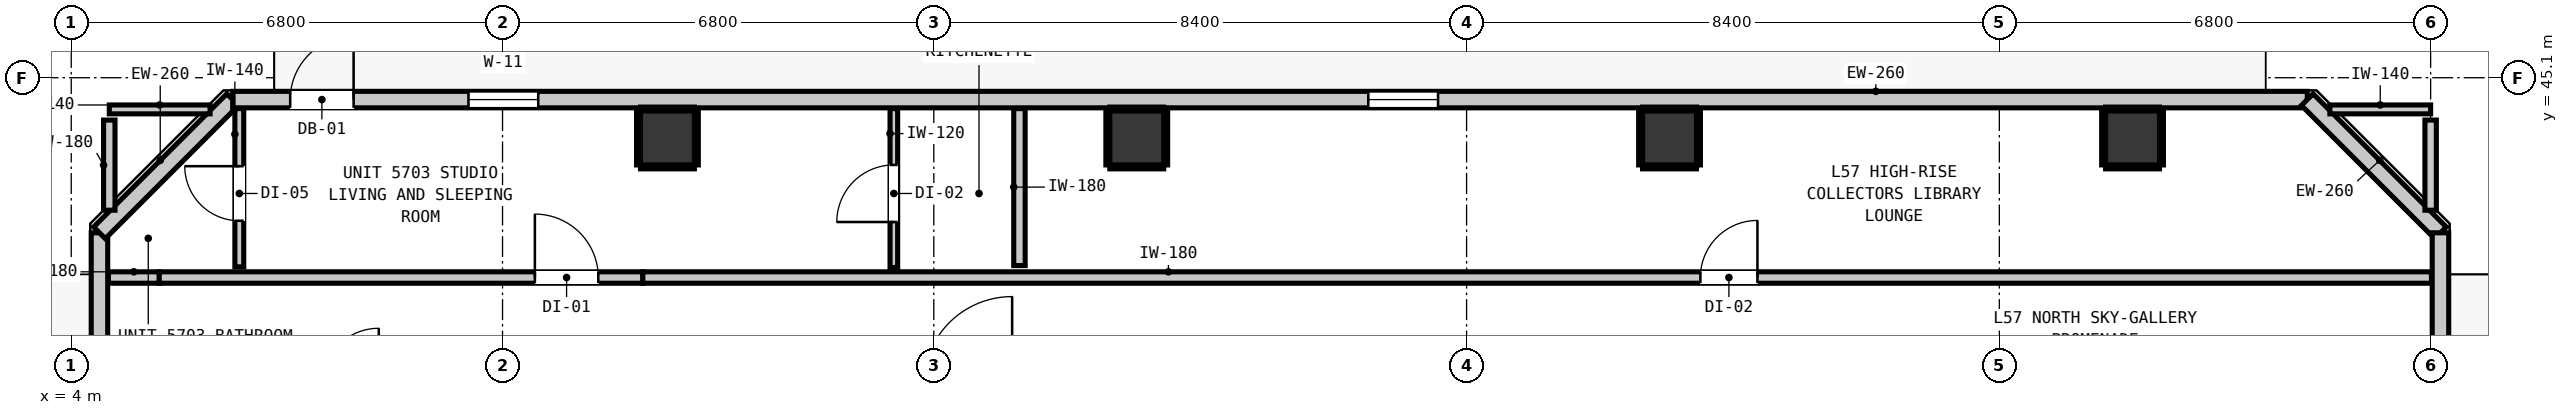
"""IFC4 building model, lengths in metres.
Left out: names, types, materials, properties, quantities, classifications, styles, units other than length and angle.
Written with IfcOpenShell. Run it as: python <this file> out.ifc"""

import sys

from ifc_helpers import new_model, si_unit, direction, frame, frame_2d, origin, origin_2d, place, context, subcontext, project, spatial, rectangle, extrude, element, fill, save


model = new_model("IFC4")
c1 = context("Model", 3, precision=1e-05, world=origin(), true_north=direction((0.0, 1.0)))
c2 = subcontext(c1, "Body", "Model", "MODEL_VIEW")
j1 = project(units=[si_unit("LENGTHUNIT", "METRE"), si_unit("PLANEANGLEUNIT", "RADIAN")], contexts=[c1])
p1 = place(None, origin())
s1 = spatial("IfcSite", under=j1, at=p1, CompositionType="ELEMENT")
p2 = place(p1, origin())
s2 = spatial("IfcBuilding", under=s1, at=p2, CompositionType="ELEMENT")
p3 = place(p2, frame((0.0, 0.0, 196.8)))
s3 = spatial("IfcBuildingStorey", under=s2, at=p3, CompositionType="ELEMENT", Elevation=196.8)
for number, where, z_axis, x_axis in (
    (1, (13.4, 44.15, 0.0), (0.0, 0.0, 1.0), (1.0, 0.0, 0.0)),
    (2, (20.8, 44.15, 0.0), (0.0, 0.0, 1.0), (1.0, 0.0, 0.0)),
    (3, (29.2, 44.15, 0.0), (0.0, 0.0, 1.0), (1.0, 0.0, 0.0)),
    (4, (36.5, 44.15, 0.0), (0.0, 0.0, 1.0), (1.0, 0.0, 0.0)),
):
    element("IfcColumn", number, at=place(p3, frame(where, z_axis=z_axis, x_axis=x_axis)), inside=s3, PredefinedType="COLUMN", context=c2, shape_type="SweptSolid", body=[
        extrude(rectangle(XDim=0.85, YDim=0.85, at=origin_2d()), origin(), (0.0, 0.0, 1.0), 3.32),
    ])
p4 = place(p3, frame((4.445, 12.345, 0.0), z_axis=(0.0, 0.0, 1.0), x_axis=(0.0, 1.0, 0.0)))
e5 = element("IfcWall", 5, at=p4, inside=s3, PredefinedType="STANDARD", context=c2, shape_type="SweptSolid", body=[
    extrude(rectangle(XDim=30.31, YDim=0.26, at=frame_2d((15.155, 0.0))), origin(), (0.0, 0.0, 1.0), 3.1),
])
p5 = place(p4, frame((0.91, 0.0, 0.0)))
e6 = element("IfcOpeningElement", 6, at=p5, cuts=e5, PredefinedType="OPENING", context=c2, shape_type="SweptSolid", body=[
    extrude(rectangle(XDim=1.0, YDim=2.15, at=frame_2d((0.5, 1.075))), frame((0.0, 0.14, 0.0), z_axis=(0.0, -1.0, 0.0), x_axis=(1.0, 0.0, 0.0)), (0.0, 0.0, 1.0), 0.28),
])
p6 = place(p4, frame((2.322, 0.0, 0.85)))
e7 = element("IfcOpeningElement", 7, at=p6, cuts=e5, PredefinedType="OPENING", context=c2, shape_type="SweptSolid", body=[
    extrude(rectangle(XDim=0.58, YDim=1.5, at=frame_2d((0.29, 0.75))), frame((0.0, 0.14, 0.0), z_axis=(0.0, -1.0, 0.0), x_axis=(1.0, 0.0, 0.0)), (0.0, 0.0, 1.0), 0.28),
])
p7 = place(p4, frame((22.155, 0.0, 0.85)))
e8 = element("IfcOpeningElement", 8, at=p7, cuts=e5, PredefinedType="OPENING", context=c2, shape_type="SweptSolid", body=[
    extrude(rectangle(XDim=1.1, YDim=2.05, at=frame_2d((0.55, 1.025))), frame((0.0, 0.14, 0.0), z_axis=(0.0, -1.0, 0.0), x_axis=(1.0, 0.0, 0.0)), (0.0, 0.0, 1.0), 0.28),
])
p8 = place(p3, frame((4.445, 42.655, 0.0), z_axis=(0.0, 0.0, 1.0), x_axis=(0.707106781187, 0.707106781187, 0.0)))
e9 = element("IfcWall", 9, at=p8, inside=s3, PredefinedType="STANDARD", context=c2, shape_type="SweptSolid", body=[
    extrude(rectangle(XDim=2.97, YDim=0.26, at=frame_2d((1.485, 0.0))), origin(), (0.0, 0.0, 1.0), 3.1),
])
p9 = place(p3, frame((6.545, 44.755, 0.0), z_axis=(0.0, 0.0, 1.0), x_axis=(1.0, 0.0, 0.0)))
e10 = element("IfcWall", 10, at=p9, inside=s3, PredefinedType="STANDARD", context=c2, shape_type="SweptSolid", body=[
    extrude(rectangle(XDim=32.71, YDim=0.26, at=frame_2d((16.355, 0.0))), origin(), (0.0, 0.0, 1.0), 3.1),
])
p10 = place(p9, frame((0.907, 0.0, 0.0)))
e11 = element("IfcOpeningElement", 11, at=p10, cuts=e10, PredefinedType="OPENING", context=c2, shape_type="SweptSolid", body=[
    extrude(rectangle(XDim=1.0, YDim=2.15, at=frame_2d((0.5, 1.075))), frame((0.0, 0.14, 0.0), z_axis=(0.0, -1.0, 0.0), x_axis=(1.0, 0.0, 0.0)), (0.0, 0.0, 1.0), 0.28),
])
p11 = place(p9, frame((3.718, 0.0, 0.85)))
e12 = element("IfcOpeningElement", 12, at=p11, cuts=e10, PredefinedType="OPENING", context=c2, shape_type="SweptSolid", body=[
    extrude(rectangle(XDim=1.1, YDim=2.05, at=frame_2d((0.55, 1.025))), frame((0.0, 0.14, 0.0), z_axis=(0.0, -1.0, 0.0), x_axis=(1.0, 0.0, 0.0)), (0.0, 0.0, 1.0), 0.28),
])
p12 = place(p9, frame((17.905, 0.0, 0.85)))
e13 = element("IfcOpeningElement", 13, at=p12, cuts=e10, PredefinedType="OPENING", context=c2, shape_type="SweptSolid", body=[
    extrude(rectangle(XDim=1.1, YDim=2.05, at=frame_2d((0.55, 1.025))), frame((0.0, 0.14, 0.0), z_axis=(0.0, -1.0, 0.0), x_axis=(1.0, 0.0, 0.0)), (0.0, 0.0, 1.0), 0.28),
])
p13 = place(p3, frame((39.255, 44.755, 0.0), z_axis=(0.0, 0.0, 1.0), x_axis=(0.707147883682, -0.707065676302, 0.0)))
e14 = element("IfcWall", 14, at=p13, inside=s3, PredefinedType="STANDARD", context=c2, shape_type="SweptSolid", body=[
    extrude(rectangle(XDim=2.97, YDim=0.26, at=frame_2d((1.485, 0.0))), origin(), (0.0, 0.0, 1.0), 3.1),
])
p14 = place(p3, frame((41.355, 42.655, 0.0), z_axis=(0.0, 0.0, 1.0), x_axis=(0.0, -1.0, 0.0)))
e15 = element("IfcWall", 15, at=p14, inside=s3, PredefinedType="STANDARD", context=c2, shape_type="SweptSolid", body=[
    extrude(rectangle(XDim=30.31, YDim=0.26, at=frame_2d((15.155, 0.0))), origin(), (0.0, 0.0, 1.0), 3.1),
])
p15 = place(p14, frame((23.818, 0.0, 0.0)))
e16 = element("IfcOpeningElement", 16, at=p15, cuts=e15, PredefinedType="OPENING", context=c2, shape_type="SweptSolid", body=[
    extrude(rectangle(XDim=1.0, YDim=2.15, at=frame_2d((0.5, 1.075))), frame((0.0, 0.14, 0.0), z_axis=(0.0, -1.0, 0.0), x_axis=(1.0, 0.0, 0.0)), (0.0, 0.0, 1.0), 0.28),
])
p16 = place(p14, frame((25.457, 0.0, 0.85)))
e17 = element("IfcOpeningElement", 17, at=p16, cuts=e15, PredefinedType="OPENING", context=c2, shape_type="SweptSolid", body=[
    extrude(rectangle(XDim=1.1, YDim=2.05, at=frame_2d((0.55, 1.025))), frame((0.0, 0.14, 0.0), z_axis=(0.0, -1.0, 0.0), x_axis=(1.0, 0.0, 0.0)), (0.0, 0.0, 1.0), 0.28),
])
p17 = place(p14, frame((28.158, 0.0, 0.85)))
e18 = element("IfcOpeningElement", 18, at=p17, cuts=e15, PredefinedType="OPENING", context=c2, shape_type="SweptSolid", body=[
    extrude(rectangle(XDim=1.1, YDim=2.05, at=frame_2d((0.55, 1.025))), frame((0.0, 0.14, 0.0), z_axis=(0.0, -1.0, 0.0), x_axis=(1.0, 0.0, 0.0)), (0.0, 0.0, 1.0), 0.28),
])
p18 = place(p3, frame((4.587, 41.95, 0.0), z_axis=(0.0, 0.0, 1.0), x_axis=(1.0, 0.0, 0.0)))
e19 = element("IfcWall", 19, at=p18, inside=s3, PredefinedType="PARTITIONING", context=c2, shape_type="SweptSolid", body=[
    extrude(rectangle(XDim=0.801, YDim=0.18, at=frame_2d((0.4, 0.0))), origin(), (0.0, 0.0, 1.0), 3.1),
])
p19 = place(p3, frame((5.388, 41.95, 0.0), z_axis=(0.0, 0.0, 1.0), x_axis=(1.0, 0.0, 0.0)))
e20 = element("IfcWall", 20, at=p19, inside=s3, PredefinedType="PARTITIONING", context=c2, shape_type="SweptSolid", body=[
    extrude(rectangle(XDim=7.624, YDim=0.18, at=frame_2d((3.812, 0.0))), origin(), (0.0, 0.0, 1.0), 2.477),
])
p20 = place(p19, frame((5.922, 0.0, 0.0)))
e21 = element("IfcOpeningElement", 21, at=p20, cuts=e20, PredefinedType="OPENING", context=c2, shape_type="SweptSolid", body=[
    extrude(rectangle(XDim=1.0, YDim=2.15, at=frame_2d((0.5, 1.075))), frame((0.0, 0.1, 0.0), z_axis=(0.0, -1.0, 0.0), x_axis=(1.0, 0.0, 0.0)), (0.0, 0.0, 1.0), 0.2),
])
p21 = place(p3, frame((13.012, 41.95, 0.0), z_axis=(0.0, 0.0, 1.0), x_axis=(1.0, 0.0, 0.0)))
e22 = element("IfcWall", 22, at=p21, inside=s3, PredefinedType="PARTITIONING", context=c2, shape_type="SweptSolid", body=[
    extrude(rectangle(XDim=28.201, YDim=0.18, at=frame_2d((14.101, 0.0))), origin(), (0.0, 0.0, 1.0), 3.1),
])
p22 = place(p21, frame((16.674, 0.0, 0.0)))
e23 = element("IfcOpeningElement", 23, at=p22, cuts=e22, PredefinedType="OPENING", context=c2, shape_type="SweptSolid", body=[
    extrude(rectangle(XDim=0.9, YDim=2.1, at=frame_2d((0.45, 1.05))), frame((0.0, 0.1, 0.0), z_axis=(0.0, -1.0, 0.0), x_axis=(1.0, 0.0, 0.0)), (0.0, 0.0, 1.0), 0.2),
])
for number, where, z_axis, x_axis in (
    (24, (4.6, 44.6, 0.0), (0.0, 0.0, 1.0), (1.0, 0.0, 0.0)),
    (25, (39.611, 44.6, 0.0), (0.0, 0.0, 1.0), (1.0, 0.0, 0.0)),
):
    element("IfcWall", number, at=place(p3, frame(where, z_axis=z_axis, x_axis=x_axis)), inside=s3, PredefinedType="PARTITIONING", context=c2, shape_type="SweptSolid", body=[
        extrude(rectangle(XDim=1.589, YDim=0.14, at=frame_2d((0.794, 0.0))), origin(), (0.0, 0.0, 1.0), 3.1),
    ])
p23 = place(p3, frame((4.6, 43.011, 0.0), z_axis=(0.0, 0.0, 1.0), x_axis=(0.0, 1.0, 0.0)))
e26 = element("IfcWall", 26, at=p23, inside=s3, PredefinedType="PARTITIONING", context=c2, shape_type="SweptSolid", body=[
    extrude(rectangle(XDim=1.421, YDim=0.18, at=frame_2d((0.71, 0.0))), origin(), (0.0, 0.0, 1.0), 3.1),
])
p24 = place(p3, frame((18.95, 42.138, 0.0), z_axis=(0.0, 0.0, 1.0), x_axis=(0.0, 1.0, 0.0)))
e27 = element("IfcWall", 27, at=p24, inside=s3, PredefinedType="PARTITIONING", context=c2, shape_type="SweptSolid", body=[
    extrude(rectangle(XDim=2.475, YDim=0.18, at=frame_2d((1.238, 0.0))), origin(), (0.0, 0.0, 1.0), 3.1),
])
p25 = place(p3, frame((41.2, 43.011, 0.0), z_axis=(0.0, 0.0, 1.0), x_axis=(0.0, 1.0, 0.0)))
e28 = element("IfcWall", 28, at=p25, inside=s3, PredefinedType="PARTITIONING", context=c2, shape_type="SweptSolid", body=[
    extrude(rectangle(XDim=1.421, YDim=0.18, at=frame_2d((0.71, 0.0))), origin(), (0.0, 0.0, 1.0), 3.1),
])
p26 = place(p3, frame((6.65, 42.118, 0.0), z_axis=(0.0, 0.0, 1.0), x_axis=(0.0, 1.0, 0.0)))
e29 = element("IfcWall", 29, at=p26, inside=s3, PredefinedType="PARTITIONING", context=c2, shape_type="SweptSolid", body=[
    extrude(rectangle(XDim=2.495, YDim=0.14, at=frame_2d((1.248, 0.0))), origin(), (0.0, 0.0, 1.0), 3.1),
])
p27 = place(p26, frame((0.727, 0.0, 0.0)))
e30 = element("IfcOpeningElement", 30, at=p27, cuts=e29, PredefinedType="OPENING", context=c2, shape_type="SweptSolid", body=[
    extrude(rectangle(XDim=0.86, YDim=2.02, at=frame_2d((0.43, 1.01))), frame((0.0, 0.08, 0.0), z_axis=(0.0, -1.0, 0.0), x_axis=(1.0, 0.0, 0.0)), (0.0, 0.0, 1.0), 0.16),
])
p28 = place(p3, frame((16.97, 42.108, 0.0), z_axis=(0.0, 0.0, 1.0), x_axis=(0.0, 1.0, 0.0)))
e31 = element("IfcWall", 31, at=p28, inside=s3, PredefinedType="PARTITIONING", context=c2, shape_type="SweptSolid", body=[
    extrude(rectangle(XDim=2.505, YDim=0.12, at=frame_2d((1.252, 0.0))), origin(), (0.0, 0.0, 1.0), 3.1),
])
p29 = place(p28, frame((0.717, 0.0, 0.0)))
e32 = element("IfcOpeningElement", 32, at=p29, cuts=e31, PredefinedType="OPENING", context=c2, shape_type="SweptSolid", body=[
    extrude(rectangle(XDim=0.9, YDim=2.1, at=frame_2d((0.45, 1.05))), frame((0.0, 0.07, 0.0), z_axis=(0.0, -1.0, 0.0), x_axis=(1.0, 0.0, 0.0)), (0.0, 0.0, 1.0), 0.14),
])
for number, where, z_axis, x_axis in (
    (33, (12.975, 43.693, 0.0), (0.0, 0.0, 1.0), (1.0, 0.0, 0.0)),
    (34, (12.975, 44.607, 0.0), (0.0, 0.0, 1.0), (1.0, 0.0, 0.0)),
    (35, (12.943, 43.725, 0.0), (0.0, 0.0, 1.0), (0.0, 1.0, 0.0)),
    (36, (13.857, 43.725, 0.0), (0.0, 0.0, 1.0), (0.0, 1.0, 0.0)),
):
    element("IfcWall", number, at=place(p3, frame(where, z_axis=z_axis, x_axis=x_axis)), inside=s3, PredefinedType="PARTITIONING", context=c2, shape_type="SweptSolid", body=[
        extrude(rectangle(XDim=0.85, YDim=0.06, at=frame_2d((0.425, 0.0))), origin(), (0.0, 0.0, 1.0), 1.45),
    ])
for number, where, z_axis, x_axis in (
    (37, (20.375, 43.693, 0.0), (0.0, 0.0, 1.0), (1.0, 0.0, 0.0)),
    (38, (20.375, 44.607, 0.0), (0.0, 0.0, 1.0), (1.0, 0.0, 0.0)),
):
    element("IfcWall", number, at=place(p3, frame(where, z_axis=z_axis, x_axis=x_axis)), inside=s3, PredefinedType="PARTITIONING", context=c2, shape_type="SweptSolid", body=[
        extrude(rectangle(XDim=0.85, YDim=0.06, at=frame_2d((0.425, 0.0))), origin(), (0.0, 0.0, 1.0), 1.45),
    ])
for number, where, z_axis, x_axis in (
    (39, (20.343, 43.725, 0.0), (0.0, 0.0, 1.0), (0.0, 1.0, 0.0)),
    (40, (21.257, 43.725, 0.0), (0.0, 0.0, 1.0), (0.0, 1.0, 0.0)),
):
    element("IfcWall", number, at=place(p3, frame(where, z_axis=z_axis, x_axis=x_axis)), inside=s3, PredefinedType="PARTITIONING", context=c2, shape_type="SweptSolid", body=[
        extrude(rectangle(XDim=0.85, YDim=0.06, at=frame_2d((0.425, 0.0))), origin(), (0.0, 0.0, 1.0), 1.45),
    ])
for number, where, z_axis, x_axis in (
    (41, (28.775, 43.693, 0.0), (0.0, 0.0, 1.0), (1.0, 0.0, 0.0)),
    (42, (28.775, 44.607, 0.0), (0.0, 0.0, 1.0), (1.0, 0.0, 0.0)),
):
    element("IfcWall", number, at=place(p3, frame(where, z_axis=z_axis, x_axis=x_axis)), inside=s3, PredefinedType="PARTITIONING", context=c2, shape_type="SweptSolid", body=[
        extrude(rectangle(XDim=0.85, YDim=0.06, at=frame_2d((0.425, 0.0))), origin(), (0.0, 0.0, 1.0), 1.45),
    ])
for number, where, z_axis, x_axis in (
    (43, (28.743, 43.725, 0.0), (0.0, 0.0, 1.0), (0.0, 1.0, 0.0)),
    (44, (29.657, 43.725, 0.0), (0.0, 0.0, 1.0), (0.0, 1.0, 0.0)),
):
    element("IfcWall", number, at=place(p3, frame(where, z_axis=z_axis, x_axis=x_axis)), inside=s3, PredefinedType="PARTITIONING", context=c2, shape_type="SweptSolid", body=[
        extrude(rectangle(XDim=0.85, YDim=0.06, at=frame_2d((0.425, 0.0))), origin(), (0.0, 0.0, 1.0), 1.45),
    ])
for number, where, z_axis, x_axis in (
    (45, (36.075, 43.693, 0.0), (0.0, 0.0, 1.0), (1.0, 0.0, 0.0)),
    (46, (36.075, 44.607, 0.0), (0.0, 0.0, 1.0), (1.0, 0.0, 0.0)),
):
    element("IfcWall", number, at=place(p3, frame(where, z_axis=z_axis, x_axis=x_axis)), inside=s3, PredefinedType="PARTITIONING", context=c2, shape_type="SweptSolid", body=[
        extrude(rectangle(XDim=0.85, YDim=0.06, at=frame_2d((0.425, 0.0))), origin(), (0.0, 0.0, 1.0), 1.45),
    ])
for number, where, z_axis, x_axis in (
    (47, (36.043, 43.725, 0.0), (0.0, 0.0, 1.0), (0.0, 1.0, 0.0)),
    (48, (36.957, 43.725, 0.0), (0.0, 0.0, 1.0), (0.0, 1.0, 0.0)),
):
    element("IfcWall", number, at=place(p3, frame(where, z_axis=z_axis, x_axis=x_axis)), inside=s3, PredefinedType="PARTITIONING", context=c2, shape_type="SweptSolid", body=[
        extrude(rectangle(XDim=0.85, YDim=0.06, at=frame_2d((0.425, 0.0))), origin(), (0.0, 0.0, 1.0), 1.45),
    ])
p30 = place(p10, origin())
e49 = element("IfcDoor", 49, at=p30, inside=s3, OperationType="SINGLE_SWING_RIGHT", PredefinedType="DOOR", context=c2, shape_type="SweptSolid", body=[
    extrude(rectangle(XDim=1.0, YDim=2.15, at=frame_2d((0.5, 1.075))), frame((0.0, 0.025, 0.0), z_axis=(0.0, -1.0, 0.0), x_axis=(1.0, 0.0, 0.0)), (0.0, 0.0, 1.0), 0.05),
])
fill(e11, e49)
p31 = place(p11, origin())
e50 = element("IfcWindow", 50, at=p31, inside=s3, PartitioningType="SINGLE_PANEL", PredefinedType="WINDOW", context=c2, shape_type="SweptSolid", body=[
    extrude(rectangle(XDim=1.1, YDim=2.05, at=frame_2d((0.55, 1.025))), frame((0.0, 0.03, 0.0), z_axis=(0.0, -1.0, 0.0), x_axis=(1.0, 0.0, 0.0)), (0.0, 0.0, 1.0), 0.06),
])
fill(e12, e50)
p32 = place(p12, origin())
e51 = element("IfcWindow", 51, at=p32, inside=s3, PartitioningType="SINGLE_PANEL", PredefinedType="WINDOW", context=c2, shape_type="SweptSolid", body=[
    extrude(rectangle(XDim=1.1, YDim=2.05, at=frame_2d((0.55, 1.025))), frame((0.0, 0.03, 0.0), z_axis=(0.0, -1.0, 0.0), x_axis=(1.0, 0.0, 0.0)), (0.0, 0.0, 1.0), 0.06),
])
fill(e13, e51)
p33 = place(p20, origin())
e52 = element("IfcDoor", 52, at=p33, inside=s3, OperationType="SINGLE_SWING_LEFT", PredefinedType="DOOR", context=c2, shape_type="SweptSolid", body=[
    extrude(rectangle(XDim=1.0, YDim=2.15, at=frame_2d((0.5, 1.075))), frame((0.0, 0.025, 0.0), z_axis=(0.0, -1.0, 0.0), x_axis=(1.0, 0.0, 0.0)), (0.0, 0.0, 1.0), 0.05),
])
fill(e21, e52)
p34 = place(p27, origin())
e53 = element("IfcDoor", 53, at=p34, inside=s3, OperationType="SINGLE_SWING_RIGHT", PredefinedType="DOOR", context=c2, shape_type="SweptSolid", body=[
    extrude(rectangle(XDim=0.86, YDim=2.02, at=frame_2d((0.43, 1.01))), frame((0.0, 0.025, 0.0), z_axis=(0.0, -1.0, 0.0), x_axis=(1.0, 0.0, 0.0)), (0.0, 0.0, 1.0), 0.05),
])
fill(e30, e53)
p35 = place(p29, origin())
e54 = element("IfcDoor", 54, at=p35, inside=s3, OperationType="SINGLE_SWING_LEFT", PredefinedType="DOOR", context=c2, shape_type="SweptSolid", body=[
    extrude(rectangle(XDim=0.9, YDim=2.1, at=frame_2d((0.45, 1.05))), frame((0.0, 0.025, 0.0), z_axis=(0.0, -1.0, 0.0), x_axis=(1.0, 0.0, 0.0)), (0.0, 0.0, 1.0), 0.05),
])
fill(e32, e54)
p36 = place(p22, origin())
e55 = element("IfcDoor", 55, at=p36, inside=s3, OperationType="SINGLE_SWING_RIGHT", PredefinedType="DOOR", context=c2, shape_type="SweptSolid", body=[
    extrude(rectangle(XDim=0.9, YDim=2.1, at=frame_2d((0.45, 1.05))), frame((0.0, 0.025, 0.0), z_axis=(0.0, -1.0, 0.0), x_axis=(1.0, 0.0, 0.0)), (0.0, 0.0, 1.0), 0.05),
])
fill(e23, e55)
save(model, sys.argv[1])
